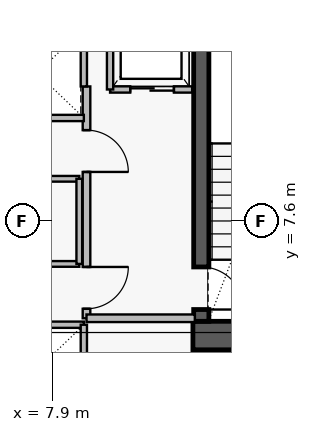
"""IFC4 building model, lengths in metres.
Left out: names, types, materials, properties, quantities, classifications, styles, units other than length and angle.
Written with IfcOpenShell. Run it as: python <this file> out.ifc"""

import sys

from ifc_helpers import new_model, si_unit, direction, frame, frame_2d, origin, place, context, subcontext, project, spatial, rectangle, extrude, element, fill, save


model = new_model("IFC4")
c1 = context("Model", 3, precision=1e-05, world=origin(), true_north=direction((0.0, 1.0)))
c2 = subcontext(c1, "Body", "Model", "MODEL_VIEW")
j1 = project(units=[si_unit("LENGTHUNIT", "METRE"), si_unit("PLANEANGLEUNIT", "RADIAN")], contexts=[c1])
p1 = place(None, origin())
s1 = spatial("IfcSite", under=j1, at=p1, CompositionType="ELEMENT")
p2 = place(p1, origin())
s2 = spatial("IfcBuilding", under=s1, at=p2, CompositionType="ELEMENT")
p3 = place(p2, frame((0.0, 0.0, 132.15)))
s3 = spatial("IfcBuildingStorey", under=s2, at=p3, CompositionType="ELEMENT", Elevation=132.15)
p4 = place(p3, frame((11.6, 4.595, 0.0), z_axis=(0.0, 0.0, 1.0), x_axis=(1.0, 0.0, 0.0)))
e1 = element("IfcWall", 1, at=p4, inside=s3, PredefinedType="SHEAR", context=c2, shape_type="SweptSolid", body=[
    extrude(rectangle(XDim=4.56, YDim=0.75, at=frame_2d((2.28, 0.0))), origin(), (0.0, 0.0, 1.0), 3.46),
])
p5 = place(p3, frame((11.82, 13.93, 0.0), z_axis=(0.0, 0.0, 1.0), x_axis=(0.0, -1.0, 0.0)))
e2 = element("IfcWall", 2, at=p5, inside=s3, PredefinedType="SHEAR", context=c2, shape_type="SweptSolid", body=[
    extrude(rectangle(XDim=8.96, YDim=0.4, at=frame_2d((4.48, 0.0))), origin(), (0.0, 0.0, 1.0), 3.46),
])
p6 = place(p5, frame((7.53, 0.0, 0.0)))
e3 = element("IfcOpeningElement", 3, at=p6, cuts=e2, PredefinedType="OPENING", context=c2, shape_type="SweptSolid", body=[
    extrude(rectangle(XDim=1.12, YDim=2.22, at=frame_2d((0.56, 1.11))), frame((0.0, 0.21, 0.0), z_axis=(0.0, -1.0, 0.0), x_axis=(1.0, 0.0, 0.0)), (0.0, 0.0, 1.0), 0.42),
])
p7 = place(p3, frame((8.8, 11.15, 0.0), z_axis=(0.0, 0.0, 1.0), x_axis=(0.0, -1.0, 0.0)))
e4 = element("IfcWall", 4, at=p7, inside=s3, PredefinedType="PARTITIONING", context=c2, shape_type="SweptSolid", body=[
    extrude(rectangle(XDim=6.1, YDim=0.2, at=frame_2d((3.05, 0.0))), origin(), (0.0, 0.0, 1.0), 3.43),
])
p8 = place(p7, frame((1.15, 0.0, 0.0)))
e5 = element("IfcOpeningElement", 5, at=p8, cuts=e4, PredefinedType="OPENING", context=c2, shape_type="SweptSolid", body=[
    extrude(rectangle(XDim=1.1, YDim=2.2, at=frame_2d((0.55, 1.1))), frame((0.0, 0.11, 0.0), z_axis=(0.0, -1.0, 0.0), x_axis=(1.0, 0.0, 0.0)), (0.0, 0.0, 1.0), 0.22),
])
p9 = place(p7, frame((4.75, 0.0, 0.0)))
e6 = element("IfcOpeningElement", 6, at=p9, cuts=e4, PredefinedType="OPENING", context=c2, shape_type="SweptSolid", body=[
    extrude(rectangle(XDim=1.1, YDim=2.2, at=frame_2d((0.55, 1.1))), frame((0.0, 0.11, 0.0), z_axis=(0.0, -1.0, 0.0), x_axis=(1.0, 0.0, 0.0)), (0.0, 0.0, 1.0), 0.22),
])
p10 = place(p3, frame((9.42, 11.07, 0.0), z_axis=(0.0, 0.0, 1.0), x_axis=(1.0, 0.0, 0.0)))
e7 = element("IfcWall", 7, at=p10, inside=s3, PredefinedType="PARTITIONING", context=c2, shape_type="SweptSolid", body=[
    extrude(rectangle(XDim=2.16, YDim=0.165, at=frame_2d((1.08, 0.0))), origin(), (0.0, 0.0, 1.0), 3.43),
])
p11 = place(p10, frame((0.53, 0.0, 0.0)))
e8 = element("IfcOpeningElement", 8, at=p11, cuts=e7, PredefinedType="OPENING", context=c2, shape_type="SweptSolid", body=[
    extrude(rectangle(XDim=1.15, YDim=2.25, at=frame_2d((0.575, 1.125))), frame((0.0, 0.093, 0.0), z_axis=(0.0, -1.0, 0.0), x_axis=(1.0, 0.0, 0.0)), (0.0, 0.0, 1.0), 0.185),
])
p12 = place(p3, frame((4.29, 6.48, 0.0), z_axis=(0.0, 0.0, 1.0), x_axis=(1.0, 0.0, 0.0)))
e9 = element("IfcWall", 9, at=p12, inside=s3, PredefinedType="PARTITIONING", context=c2, shape_type="SweptSolid", body=[
    extrude(rectangle(XDim=4.32, YDim=0.15, at=frame_2d((2.16, 0.0))), origin(), (0.0, 0.0, 1.0), 3.43),
])
p13 = place(p12, frame((1.71, 0.0, 0.0)))
e10 = element("IfcOpeningElement", 10, at=p13, cuts=e9, PredefinedType="OPENING", context=c2, shape_type="SweptSolid", body=[
    extrude(rectangle(XDim=0.9, YDim=2.15, at=frame_2d((0.45, 1.075))), frame((0.0, 0.085, 0.0), z_axis=(0.0, -1.0, 0.0), x_axis=(1.0, 0.0, 0.0)), (0.0, 0.0, 1.0), 0.17),
])
p14 = place(p3, frame((8.8, 5.05, 0.0), z_axis=(0.0, 0.0, 1.0), x_axis=(1.0, 0.0, 0.0)))
e11 = element("IfcWall", 11, at=p14, inside=s3, PredefinedType="PARTITIONING", context=c2, shape_type="SweptSolid", body=[
    extrude(rectangle(XDim=2.85, YDim=0.2, at=frame_2d((1.425, 0.0))), origin(), (0.0, 0.0, 1.0), 3.43),
])
p15 = place(p3, frame((9.42, 11.07, 0.0), z_axis=(0.0, 0.0, 1.0), x_axis=(0.0, 1.0, 0.0)))
e12 = element("IfcWall", 12, at=p15, inside=s3, PredefinedType="PARTITIONING", context=c2, shape_type="SweptSolid", body=[
    extrude(rectangle(XDim=2.96, YDim=0.165, at=frame_2d((1.48, 0.0))), origin(), (0.0, 0.0, 1.0), 3.43),
])
p16 = place(p3, frame((6.25, 4.88, 0.0), z_axis=(0.0, 0.0, 1.0), x_axis=(1.0, 0.0, 0.0)))
e13 = element("IfcWall", 13, at=p16, inside=s3, PredefinedType="PARTITIONING", context=c2, shape_type="SweptSolid", body=[
    extrude(rectangle(XDim=2.48, YDim=0.165, at=frame_2d((1.24, 0.0))), origin(), (0.0, 0.0, 1.0), 3.43),
])
p17 = place(p3, frame((8.73, 2.52, 0.0), z_axis=(0.0, 0.0, 1.0), x_axis=(0.0, 1.0, 0.0)))
e14 = element("IfcWall", 14, at=p17, inside=s3, PredefinedType="PARTITIONING", context=c2, shape_type="SweptSolid", body=[
    extrude(rectangle(XDim=2.36, YDim=0.165, at=frame_2d((1.18, 0.0))), origin(), (0.0, 0.0, 1.0), 3.43),
])
p18 = place(p3, frame((6.25, 10.32, 0.0), z_axis=(0.0, 0.0, 1.0), x_axis=(1.0, 0.0, 0.0)))
e15 = element("IfcWall", 15, at=p18, inside=s3, PredefinedType="PARTITIONING", context=c2, shape_type="SweptSolid", body=[
    extrude(rectangle(XDim=2.48, YDim=0.165, at=frame_2d((1.24, 0.0))), origin(), (0.0, 0.0, 1.0), 3.43),
])
p19 = place(p3, frame((8.73, 11.15, 0.0), z_axis=(0.0, 0.0, 1.0), x_axis=(0.0, 1.0, 0.0)))
e16 = element("IfcWall", 16, at=p19, inside=s3, PredefinedType="PARTITIONING", context=c2, shape_type="SweptSolid", body=[
    extrude(rectangle(XDim=1.53, YDim=0.165, at=frame_2d((0.765, 0.0))), origin(), (0.0, 0.0, 1.0), 3.43),
])
p20 = place(p3, frame((4.29, 8.72, 0.0), z_axis=(0.0, 0.0, 1.0), x_axis=(1.0, 0.0, 0.0)))
e17 = element("IfcWall", 17, at=p20, inside=s3, PredefinedType="PARTITIONING", context=c2, shape_type="SweptSolid", body=[
    extrude(rectangle(XDim=4.32, YDim=0.15, at=frame_2d((2.16, 0.0))), origin(), (0.0, 0.0, 1.0), 3.43),
])
p21 = place(p3, frame((8.61, 6.48, 0.0), z_axis=(0.0, 0.0, 1.0), x_axis=(0.0, 1.0, 0.0)))
e18 = element("IfcWall", 18, at=p21, inside=s3, PredefinedType="PARTITIONING", context=c2, shape_type="SweptSolid", body=[
    extrude(rectangle(XDim=2.24, YDim=0.15, at=frame_2d((1.12, 0.0))), origin(), (0.0, 0.0, 1.0), 3.43),
])
p22 = place(p6, origin())
e19 = element("IfcDoor", 19, at=p22, inside=s3, OperationType="SINGLE_SWING_RIGHT", PredefinedType="DOOR", context=c2, shape_type="SweptSolid", body=[
    extrude(rectangle(XDim=1.12, YDim=2.22, at=frame_2d((0.56, 1.11))), frame((0.0, 0.025, 0.0), z_axis=(0.0, -1.0, 0.0), x_axis=(1.0, 0.0, 0.0)), (0.0, 0.0, 1.0), 0.05),
])
fill(e3, e19)
p23 = place(p8, origin())
e20 = element("IfcDoor", 20, at=p23, inside=s3, OperationType="SINGLE_SWING_RIGHT", PredefinedType="DOOR", context=c2, shape_type="SweptSolid", body=[
    extrude(rectangle(XDim=1.1, YDim=2.2, at=frame_2d((0.55, 1.1))), frame((0.0, 0.025, 0.0), z_axis=(0.0, -1.0, 0.0), x_axis=(1.0, 0.0, 0.0)), (0.0, 0.0, 1.0), 0.05),
])
fill(e5, e20)
p24 = place(p9, origin())
e21 = element("IfcDoor", 21, at=p24, inside=s3, OperationType="SINGLE_SWING_LEFT", PredefinedType="DOOR", context=c2, shape_type="SweptSolid", body=[
    extrude(rectangle(XDim=1.1, YDim=2.2, at=frame_2d((0.55, 1.1))), frame((0.0, 0.025, 0.0), z_axis=(0.0, -1.0, 0.0), x_axis=(1.0, 0.0, 0.0)), (0.0, 0.0, 1.0), 0.05),
])
fill(e6, e21)
p25 = place(p11, origin())
e22 = element("IfcDoor", 22, at=p25, inside=s3, OperationType="SLIDING_TO_LEFT", PredefinedType="DOOR", context=c2, shape_type="SweptSolid", body=[
    extrude(rectangle(XDim=1.15, YDim=2.25, at=frame_2d((0.575, 1.125))), frame((0.0, 0.025, 0.0), z_axis=(0.0, -1.0, 0.0), x_axis=(1.0, 0.0, 0.0)), (0.0, 0.0, 1.0), 0.05),
])
fill(e8, e22)
save(model, sys.argv[1])
